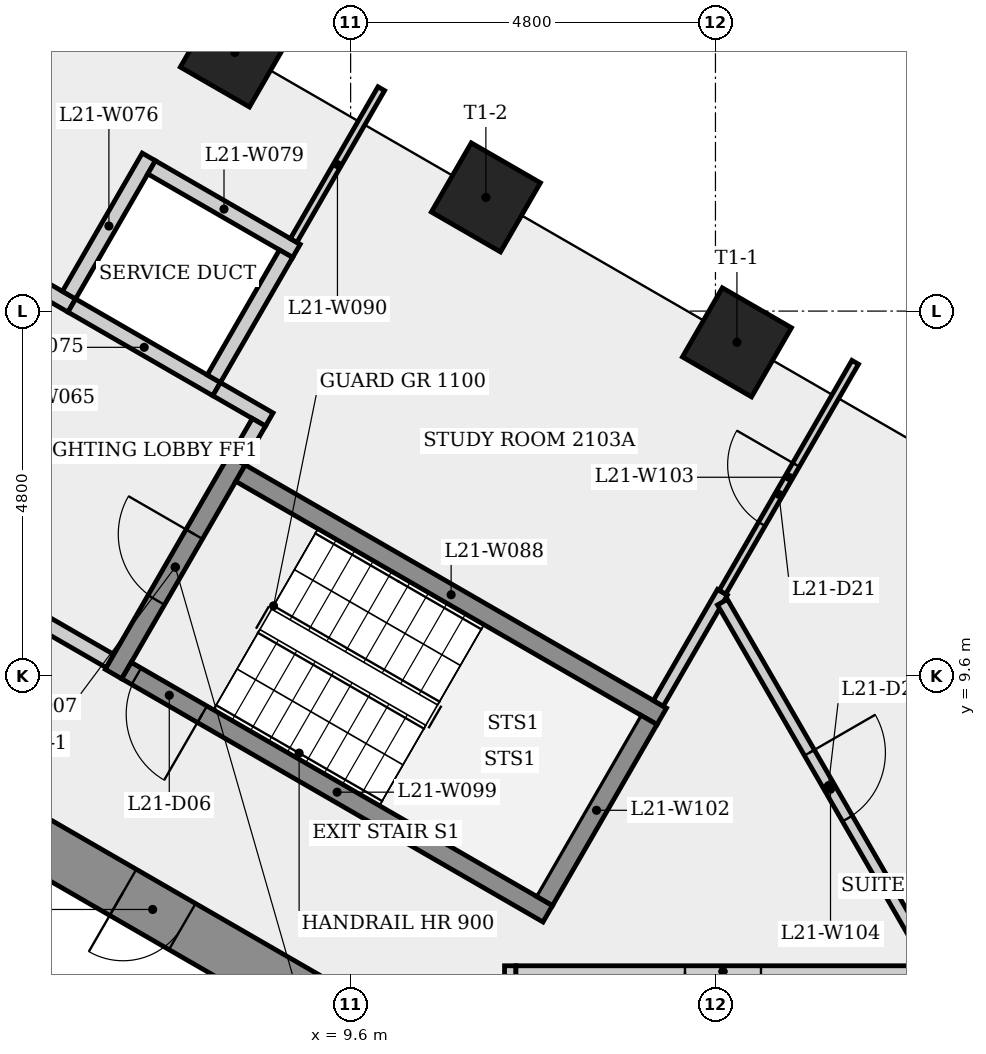
"""IFC4 building model, lengths in metres.
Left out: names, types, materials, properties, quantities, classifications, styles, units other than length and angle.
Written with IfcOpenShell. Run it as: python <this file> out.ifc"""

import sys

from ifc_helpers import new_model, si_unit, direction, frame, frame_2d, origin, origin_2d, place, context, subcontext, project, spatial, rectangle, extrude, element, fill, save


model = new_model("IFC4")
c1 = context("Model", 3, precision=1e-05, world=origin(), true_north=direction((0.0, 1.0)))
c2 = subcontext(c1, "Body", "Model", "MODEL_VIEW")
j1 = project(units=[si_unit("LENGTHUNIT", "METRE"), si_unit("PLANEANGLEUNIT", "RADIAN")], contexts=[c1])
p1 = place(None, origin())
s1 = spatial("IfcSite", under=j1, at=p1, CompositionType="ELEMENT")
p2 = place(p1, origin())
s2 = spatial("IfcBuilding", under=s1, at=p2, CompositionType="ELEMENT")
p3 = place(p2, frame((0.0, 0.0, 83.1)))
s3 = spatial("IfcBuildingStorey", under=s2, at=p3, CompositionType="ELEMENT", Elevation=83.1)
p4 = place(p3, frame((9.325, 5.182, 0.0), z_axis=(0.0, 0.0, 1.0), x_axis=(-0.866023993627, 0.500002442456, 0.0)))
e1 = element("IfcWall", 1, at=p4, inside=s3, PredefinedType="SHEAR", context=c2, shape_type="SweptSolid", body=[
    extrude(rectangle(XDim=10.97, YDim=0.7, at=frame_2d((5.485, 0.0))), origin(), (0.0, 0.0, 1.0), 3.4),
])
p5 = place(p4, frame((8.96, 0.0, 0.0)))
e2 = element("IfcOpeningElement", 2, at=p5, cuts=e1, PredefinedType="OPENING", context=c2, shape_type="SweptSolid", body=[
    extrude(rectangle(XDim=0.9, YDim=2.1, at=frame_2d((0.45, 1.05))), frame((0.0, 0.36, 0.0), z_axis=(0.0, -1.0, 0.0), x_axis=(1.0, 0.0, 0.0)), (0.0, 0.0, 1.0), 0.72),
])
p6 = place(p4, frame((2.24, 0.0, 0.0)))
e3 = element("IfcOpeningElement", 3, at=p6, cuts=e1, PredefinedType="OPENING", context=c2, shape_type="SweptSolid", body=[
    extrude(rectangle(XDim=0.9, YDim=2.1, at=frame_2d((0.45, 1.05))), frame((0.0, 0.36, 0.0), z_axis=(0.0, -1.0, 0.0), x_axis=(1.0, 0.0, 0.0)), (0.0, 0.0, 1.0), 0.72),
])
for number, where, z_axis, x_axis in (
    (4, (14.683, 13.989, 0.0), (0.0, 0.0, 1.0), (0.5, 0.866, 0.0)),
    (5, (11.379, 15.896, 0.0), (0.0, 0.0, 1.0), (0.5, 0.866, 0.0)),
    (6, (8.076, 17.803, 0.0), (0.0, 0.0, 1.0), (0.5, 0.866, 0.0)),
):
    element("IfcColumn", number, at=place(p3, frame(where, z_axis=z_axis, x_axis=x_axis)), inside=s3, PredefinedType="COLUMN", context=c2, shape_type="SweptSolid", body=[
        extrude(rectangle(XDim=1.05, YDim=1.05, at=origin_2d()), origin(), (0.0, 0.0, 1.0), 3.4),
    ])
p7 = place(p3, frame((4.459, 15.323, 0.0), z_axis=(0.0, 0.0, 1.0), x_axis=(0.866025371046, -0.500000056704, 0.0)))
e7 = element("IfcWall", 7, at=p7, inside=s3, PredefinedType="PARTITIONING", context=c2, shape_type="SweptSolid", body=[
    extrude(rectangle(XDim=1.7, YDim=0.2, at=frame_2d((0.85, 0.0))), origin(), (0.0, 0.0, 1.0), 3.05),
])
p8 = place(p3, frame((5.931, 14.473, 0.0), z_axis=(0.0, 0.0, 1.0), x_axis=(0.866008176907, -0.50002983664, 0.0)))
e8 = element("IfcWall", 8, at=p8, inside=s3, PredefinedType="PLUMBINGWALL", context=c2, shape_type="SweptSolid", body=[
    extrude(rectangle(XDim=2.2, YDim=0.2, at=frame_2d((1.1, 0.0))), origin(), (0.0, 0.0, 1.0), 3.05),
])
p9 = place(p3, frame((5.895, 14.61, 0.0), z_axis=(0.0, 0.0, 1.0), x_axis=(0.49994051562, 0.866059744384, 0.0)))
e9 = element("IfcWall", 9, at=p9, inside=s3, PredefinedType="PLUMBINGWALL", context=c2, shape_type="SweptSolid", body=[
    extrude(rectangle(XDim=2.1, YDim=0.2, at=frame_2d((1.05, 0.0))), origin(), (0.0, 0.0, 1.0), 3.05),
])
p10 = place(p3, frame((6.435, 9.795, 0.0), z_axis=(0.0, 0.0, 1.0), x_axis=(-0.866012907634, 0.500021643343, 0.0)))
e10 = element("IfcWall", 10, at=p10, inside=s3, PredefinedType="PARTITIONING", context=c2, shape_type="SweptSolid", body=[
    extrude(rectangle(XDim=4.45, YDim=0.2, at=frame_2d((2.225, 0.0))), origin(), (0.0, 0.0, 1.0), 3.05),
])
p11 = place(p10, frame((1.675, 0.0, 0.0)))
e11 = element("IfcOpeningElement", 11, at=p11, cuts=e10, PredefinedType="OPENING", context=c2, shape_type="SweptSolid", body=[
    extrude(rectangle(XDim=1.1, YDim=2.1, at=frame_2d((0.55, 1.05))), frame((0.0, 0.11, 0.0), z_axis=(0.0, -1.0, 0.0), x_axis=(1.0, 0.0, 0.0)), (0.0, 0.0, 1.0), 0.22),
])
p12 = place(p3, frame((6.48, 9.624, 0.0), z_axis=(0.0, 0.0, 1.0), x_axis=(0.500017246033, 0.866015446554, 0.0)))
e12 = element("IfcWall", 12, at=p12, inside=s3, PredefinedType="SHEAR", context=c2, shape_type="SweptSolid", body=[
    extrude(rectangle(XDim=3.25, YDim=0.25, at=frame_2d((1.625, 0.0))), origin(), (0.0, 0.0, 1.0), 3.05),
])
p13 = place(p12, frame((1.125, 0.0, 0.0)))
e13 = element("IfcOpeningElement", 13, at=p13, cuts=e12, PredefinedType="OPENING", context=c2, shape_type="SweptSolid", body=[
    extrude(rectangle(XDim=1.0, YDim=2.1, at=frame_2d((0.5, 1.05))), frame((0.0, 0.135, 0.0), z_axis=(0.0, -1.0, 0.0), x_axis=(1.0, 0.0, 0.0)), (0.0, 0.0, 1.0), 0.27),
])
p14 = place(p3, frame((6.981, 16.292, 0.0), z_axis=(0.0, 0.0, 1.0), x_axis=(0.866035918664, -0.499981787252, 0.0)))
e14 = element("IfcWall", 14, at=p14, inside=s3, PredefinedType="PLUMBINGWALL", context=c2, shape_type="SweptSolid", body=[
    extrude(rectangle(XDim=2.2, YDim=0.2, at=frame_2d((1.1, 0.0))), origin(), (0.0, 0.0, 1.0), 3.05),
])
p15 = place(p3, frame((7.836, 13.373, 0.0), z_axis=(0.0, 0.0, 1.0), x_axis=(0.866094119867, -0.499880961361, 0.0)))
e15 = element("IfcWall", 15, at=p15, inside=s3, PredefinedType="PARTITIONING", context=c2, shape_type="SweptSolid", body=[
    extrude(rectangle(XDim=0.8, YDim=0.2, at=frame_2d((0.4, 0.0))), origin(), (0.0, 0.0, 1.0), 3.05),
])
p16 = place(p3, frame((8.151, 12.268, 0.0), z_axis=(0.0, 0.0, 1.0), x_axis=(0.866025499775, -0.499999833739, 0.0)))
e16 = element("IfcWall", 16, at=p16, inside=s3, PredefinedType="SHEAR", context=c2, shape_type="SweptSolid", body=[
    extrude(rectangle(XDim=6.4, YDim=0.25, at=frame_2d((3.2, 0.0))), origin(), (0.0, 0.0, 1.0), 3.05),
])
p17 = place(p3, frame((8.393, 12.937, 0.0), z_axis=(0.0, 0.0, 1.0), x_axis=(-0.500065409566, -0.86598763626, 0.0)))
e17 = element("IfcWall", 17, at=p17, inside=s3, PredefinedType="PARTITIONING", context=c2, shape_type="SweptSolid", body=[
    extrude(rectangle(XDim=0.575, YDim=0.2, at=frame_2d((0.288, 0.0))), origin(), (0.0, 0.0, 1.0), 3.05),
])
p18 = place(p3, frame((8.85, 15.329, 0.0), z_axis=(0.0, 0.0, 1.0), x_axis=(0.500009533716, 0.866019899421, 0.0)))
e18 = element("IfcWall", 18, at=p18, inside=s3, PredefinedType="PARTITIONING", context=c2, shape_type="SweptSolid", body=[
    extrude(rectangle(XDim=2.307, YDim=0.1, at=frame_2d((1.153, 0.0))), origin(), (0.0, 0.0, 1.0), 3.05),
])
p19 = place(p3, frame((8.75, 15.156, 0.0), z_axis=(0.0, 0.0, 1.0), x_axis=(-0.499967155389, -0.866044365799, 0.0)))
e19 = element("IfcWall", 19, at=p19, inside=s3, PredefinedType="PLUMBINGWALL", context=c2, shape_type="SweptSolid", body=[
    extrude(rectangle(XDim=1.9, YDim=0.2, at=frame_2d((0.95, 0.0))), origin(), (0.0, 0.0, 1.0), 3.05),
])
p20 = place(p3, frame((11.7, -5.636, 0.0), z_axis=(0.0, 0.0, 1.0), x_axis=(0.0, 1.0, 0.0)))
e20 = element("IfcWall", 20, at=p20, inside=s3, PredefinedType="PARTITIONING", context=c2, shape_type="SweptSolid", body=[
    extrude(rectangle(XDim=11.422, YDim=0.15, at=frame_2d((5.711, 0.0))), origin(), (0.0, 0.0, 1.0), 3.05),
])
p21 = place(p20, frame((5.136, 0.0, 0.0)))
e21 = element("IfcOpeningElement", 21, at=p21, cuts=e20, PredefinedType="OPENING", context=c2, shape_type="SweptSolid", body=[
    extrude(rectangle(XDim=1.0, YDim=2.1, at=frame_2d((0.5, 1.05))), frame((0.0, 0.085, 0.0), z_axis=(0.0, -1.0, 0.0), x_axis=(1.0, 0.0, 0.0)), (0.0, 0.0, 1.0), 0.17),
])
p22 = place(p3, frame((12.194, 6.47, 0.0), z_axis=(0.0, 0.0, 1.0), x_axis=(-0.866025499775, 0.499999833739, 0.0)))
e22 = element("IfcWall", 22, at=p22, inside=s3, PredefinedType="SHEAR", context=c2, shape_type="SweptSolid", body=[
    extrude(rectangle(XDim=6.4, YDim=0.25, at=frame_2d((3.2, 0.0))), origin(), (0.0, 0.0, 1.0), 3.05),
])
p23 = place(p22, frame((5.25, 0.0, 0.0)))
e23 = element("IfcOpeningElement", 23, at=p23, cuts=e22, PredefinedType="OPENING", context=c2, shape_type="SweptSolid", body=[
    extrude(rectangle(XDim=1.0, YDim=2.1, at=frame_2d((0.5, 1.05))), frame((0.0, 0.135, 0.0), z_axis=(0.0, -1.0, 0.0), x_axis=(1.0, 0.0, 0.0)), (0.0, 0.0, 1.0), 0.27),
])
p24 = place(p3, frame((13.648, 9.239, 0.0), z_axis=(0.0, 0.0, 1.0), x_axis=(0.500027029611, 0.866009797669, 0.0)))
e24 = element("IfcWall", 24, at=p24, inside=s3, PredefinedType="PARTITIONING", context=c2, shape_type="SweptSolid", body=[
    extrude(rectangle(XDim=1.688, YDim=0.15, at=frame_2d((0.844, 0.0))), origin(), (0.0, 0.0, 1.0), 3.05),
])
p25 = place(p3, frame((13.523, 9.022, 0.0), z_axis=(0.0, 0.0, 1.0), x_axis=(-0.500034990121, -0.866005201286, 0.0)))
e25 = element("IfcWall", 25, at=p25, inside=s3, PredefinedType="SHEAR", context=c2, shape_type="SweptSolid", body=[
    extrude(rectangle(XDim=2.75, YDim=0.25, at=frame_2d((1.375, 0.0))), origin(), (0.0, 0.0, 1.0), 3.05),
])
p26 = place(p3, frame((14.492, 10.701, 0.0), z_axis=(0.0, 0.0, 1.0), x_axis=(0.500024920542, 0.866011015424, 0.0)))
e26 = element("IfcWall", 26, at=p26, inside=s3, PredefinedType="PARTITIONING", context=c2, shape_type="SweptSolid", body=[
    extrude(rectangle(XDim=3.493, YDim=0.1, at=frame_2d((1.747, 0.0))), origin(), (0.0, 0.0, 1.0), 3.05),
])
p27 = place(p26, frame((1.036, 0.0, 0.0)))
e27 = element("IfcOpeningElement", 27, at=p27, cuts=e26, PredefinedType="OPENING", context=c2, shape_type="SweptSolid", body=[
    extrude(rectangle(XDim=0.9, YDim=2.1, at=frame_2d((0.45, 1.05))), frame((0.0, 0.06, 0.0), z_axis=(0.0, -1.0, 0.0), x_axis=(1.0, 0.0, 0.0)), (0.0, 0.0, 1.0), 0.12),
])
p28 = place(p3, frame((14.492, 10.571, 0.0), z_axis=(0.0, 0.0, 1.0), x_axis=(0.50000363893, -0.866023302837, 0.0)))
e28 = element("IfcWall", 28, at=p28, inside=s3, PredefinedType="PARTITIONING", context=c2, shape_type="SweptSolid", body=[
    extrude(rectangle(XDim=5.687, YDim=0.15, at=frame_2d((2.844, 0.0))), origin(), (0.0, 0.0, 1.0), 3.05),
])
p29 = place(p28, frame((2.289, 0.0, 0.0)))
e29 = element("IfcOpeningElement", 29, at=p29, cuts=e28, PredefinedType="OPENING", context=c2, shape_type="SweptSolid", body=[
    extrude(rectangle(XDim=1.0, YDim=2.1, at=frame_2d((0.5, 1.05))), frame((0.0, 0.085, 0.0), z_axis=(0.0, -1.0, 0.0), x_axis=(1.0, 0.0, 0.0)), (0.0, 0.0, 1.0), 0.17),
])
p30 = place(p3, frame((17.223, 5.711, 0.0), z_axis=(0.0, 0.0, 1.0), x_axis=(-1.0, 0.0, 0.0)))
e30 = element("IfcWall", 30, at=p30, inside=s3, PredefinedType="PARTITIONING", context=c2, shape_type="SweptSolid", body=[
    extrude(rectangle(XDim=5.448, YDim=0.15, at=frame_2d((2.724, 0.0))), origin(), (0.0, 0.0, 1.0), 3.05),
])
p31 = place(p30, frame((2.224, 0.0, 0.0)))
e31 = element("IfcOpeningElement", 31, at=p31, cuts=e30, PredefinedType="OPENING", context=c2, shape_type="SweptSolid", body=[
    extrude(rectangle(XDim=1.0, YDim=2.1, at=frame_2d((0.5, 1.05))), frame((0.0, 0.085, 0.0), z_axis=(0.0, -1.0, 0.0), x_axis=(1.0, 0.0, 0.0)), (0.0, 0.0, 1.0), 0.17),
])
p32 = place(p23, origin())
e32 = element("IfcDoor", 32, at=p32, inside=s3, OperationType="SINGLE_SWING_LEFT", PredefinedType="DOOR", context=c2, shape_type="SweptSolid", body=[
    extrude(rectangle(XDim=1.0, YDim=2.1, at=frame_2d((0.5, 1.05))), frame((0.0, 0.025, 0.0), z_axis=(0.0, -1.0, 0.0), x_axis=(1.0, 0.0, 0.0)), (0.0, 0.0, 1.0), 0.05),
])
fill(e23, e32)
p33 = place(p13, origin())
e33 = element("IfcDoor", 33, at=p33, inside=s3, OperationType="SINGLE_SWING_RIGHT", PredefinedType="DOOR", context=c2, shape_type="SweptSolid", body=[
    extrude(rectangle(XDim=1.0, YDim=2.1, at=frame_2d((0.5, 1.05))), frame((0.0, 0.025, 0.0), z_axis=(0.0, -1.0, 0.0), x_axis=(1.0, 0.0, 0.0)), (0.0, 0.0, 1.0), 0.05),
])
fill(e13, e33)
p34 = place(p31, origin())
e34 = element("IfcDoor", 34, at=p34, inside=s3, OperationType="SINGLE_SWING_RIGHT", PredefinedType="DOOR", context=c2, shape_type="SweptSolid", body=[
    extrude(rectangle(XDim=1.0, YDim=2.1, at=frame_2d((0.5, 1.05))), frame((0.0, 0.025, 0.0), z_axis=(0.0, -1.0, 0.0), x_axis=(1.0, 0.0, 0.0)), (0.0, 0.0, 1.0), 0.05),
])
fill(e31, e34)
p35 = place(p29, origin())
e35 = element("IfcDoor", 35, at=p35, inside=s3, OperationType="SINGLE_SWING_LEFT", PredefinedType="DOOR", context=c2, shape_type="SweptSolid", body=[
    extrude(rectangle(XDim=1.0, YDim=2.1, at=frame_2d((0.5, 1.05))), frame((0.0, 0.025, 0.0), z_axis=(0.0, -1.0, 0.0), x_axis=(1.0, 0.0, 0.0)), (0.0, 0.0, 1.0), 0.05),
])
fill(e29, e35)
p36 = place(p27, origin())
e36 = element("IfcDoor", 36, at=p36, inside=s3, OperationType="SINGLE_SWING_RIGHT", PredefinedType="DOOR", context=c2, shape_type="SweptSolid", body=[
    extrude(rectangle(XDim=0.9, YDim=2.1, at=frame_2d((0.45, 1.05))), frame((0.0, 0.025, 0.0), z_axis=(0.0, -1.0, 0.0), x_axis=(1.0, 0.0, 0.0)), (0.0, 0.0, 1.0), 0.05),
])
fill(e27, e36)
p37 = place(p6, origin())
e37 = element("IfcDoor", 37, at=p37, inside=s3, OperationType="SINGLE_SWING_RIGHT", PredefinedType="DOOR", context=c2, shape_type="SweptSolid", body=[
    extrude(rectangle(XDim=0.9, YDim=2.1, at=frame_2d((0.45, 1.05))), frame((0.0, 0.025, 0.0), z_axis=(0.0, -1.0, 0.0), x_axis=(1.0, 0.0, 0.0)), (0.0, 0.0, 1.0), 0.05),
])
fill(e3, e37)
save(model, sys.argv[1])
